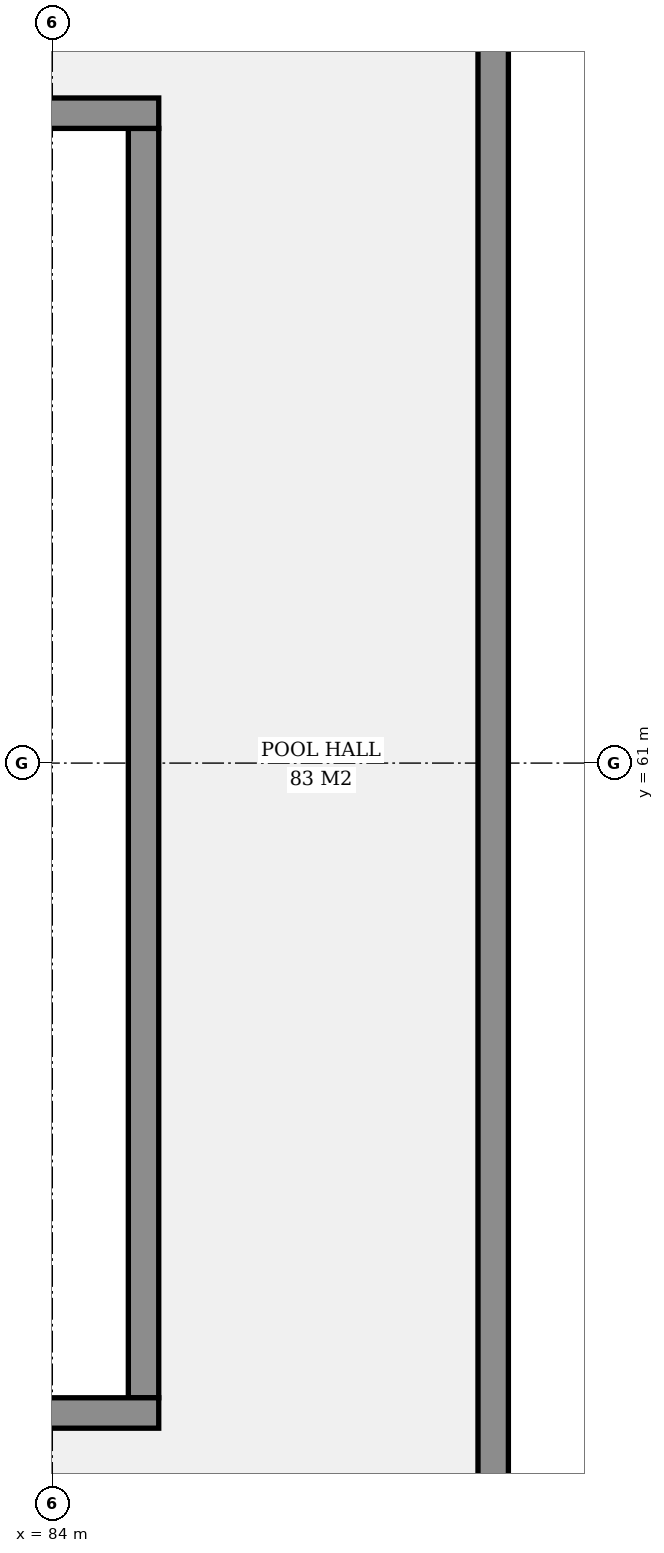
"""IFC4 building model, lengths in metres.
Left out: names, types, materials, properties, quantities, classifications, styles, units other than length and angle.
Written with IfcOpenShell. Run it as: python <this file> out.ifc"""

import sys

from ifc_helpers import new_model, si_unit, direction, frame, frame_2d, origin, place, context, subcontext, project, spatial, rectangle, extrude, element, save


model = new_model("IFC4")
c1 = context("Model", 3, precision=1e-05, world=origin(), true_north=direction((0.0, 1.0)))
c2 = subcontext(c1, "Body", "Model", "MODEL_VIEW")
j1 = project(units=[si_unit("LENGTHUNIT", "METRE"), si_unit("PLANEANGLEUNIT", "RADIAN")], contexts=[c1])
p1 = place(None, origin())
s1 = spatial("IfcSite", under=j1, at=p1, CompositionType="ELEMENT")
p2 = place(p1, origin())
s2 = spatial("IfcBuilding", under=s1, at=p2, CompositionType="ELEMENT")
p3 = place(p2, origin())
s3 = spatial("IfcBuildingStorey", under=s2, at=p3, CompositionType="ELEMENT", Elevation=0.0)
p4 = place(p3, frame((89.8, 48.5, -3.0), z_axis=(0.0, 0.0, 1.0), x_axis=(0.0, 1.0, 0.0)))
e1 = element("IfcWall", 1, at=p4, inside=s3, PredefinedType="SOLIDWALL", context=c2, shape_type="SweptSolid", body=[
    extrude(rectangle(XDim=25.0, YDim=0.4, at=frame_2d((12.5, 0.0))), origin(), (0.0, 0.0, 1.0), 2.75),
])
for number, where, z_axis, x_axis in (
    (2, (59.6, 52.45, -1.8), (0.0, 0.0, 1.0), (1.0, 0.0, 0.0)),
    (3, (59.6, 69.55, -1.8), (0.0, 0.0, 1.0), (1.0, 0.0, 0.0)),
):
    element("IfcWall", number, at=place(p3, frame(where, z_axis=z_axis, x_axis=x_axis)), inside=s3, PredefinedType="SOLIDWALL", context=c2, shape_type="SweptSolid", body=[
        extrude(rectangle(XDim=25.8, YDim=0.4, at=frame_2d((12.9, 0.0))), origin(), (0.0, 0.0, 1.0), 1.55),
    ])
p5 = place(p3, frame((85.2, 52.65, -1.8), z_axis=(0.0, 0.0, 1.0), x_axis=(0.0, 1.0, 0.0)))
e4 = element("IfcWall", 4, at=p5, inside=s3, PredefinedType="SOLIDWALL", context=c2, shape_type="SweptSolid", body=[
    extrude(rectangle(XDim=16.7, YDim=0.4, at=frame_2d((8.35, 0.0))), origin(), (0.0, 0.0, 1.0), 1.55),
])
save(model, sys.argv[1])
